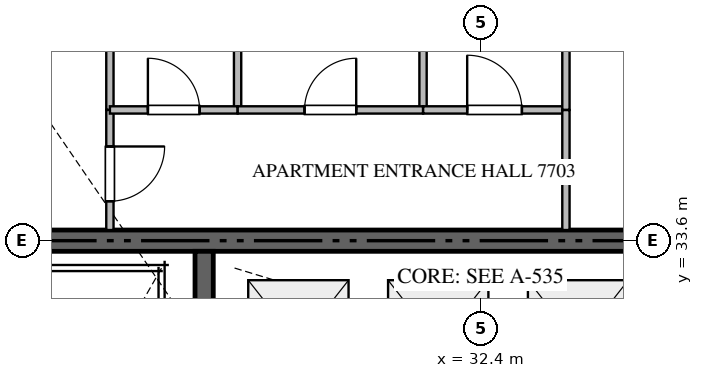
"""IFC4 building model, lengths in metres.
Left out: names, types, materials, properties, quantities, classifications, styles, units other than length and angle.
Written with IfcOpenShell. Run it as: python <this file> out.ifc"""

import sys

from ifc_helpers import new_model, si_unit, direction, frame, frame_2d, origin, place, context, subcontext, project, spatial, rectangle, extrude, source, transform, mapped, element, fill, save


model = new_model("IFC4")
c1 = context("Model", 3, precision=1e-05, world=origin(), true_north=direction((0.0, 1.0)))
c2 = subcontext(c1, "Body", "Model", "MODEL_VIEW")
j1 = project(units=[si_unit("LENGTHUNIT", "METRE"), si_unit("PLANEANGLEUNIT", "RADIAN")], contexts=[c1])
p1 = place(None, origin())
s1 = spatial("IfcSite", under=j1, at=p1, CompositionType="ELEMENT")
p2 = place(p1, origin())
s2 = spatial("IfcBuilding", under=s1, at=p2, CompositionType="ELEMENT")
p3 = place(p2, frame((0.0, 0.0, 309.65)))
s3 = spatial("IfcBuildingStorey", under=s2, at=p3, CompositionType="ELEMENT", Elevation=309.65)
p4 = place(p3, frame((41.4, 33.6, -0.26), z_axis=(0.0, 0.0, 1.0), x_axis=(-1.0, 0.0, 0.0)))
e1 = element("IfcWall", 1, at=p4, inside=s3, PredefinedType="SHEAR", context=c2, shape_type="SweptSolid", body=[
    extrude(rectangle(XDim=18.0, YDim=0.35, at=frame_2d((9.0, 0.0))), origin(), (0.0, 0.0, 1.0), 4.048),
])
p5 = place(p3, frame((27.85, 23.55, -0.26), z_axis=(0.0, 0.0, 1.0), x_axis=(0.0, 1.0, 0.0)))
e2 = element("IfcWall", 2, at=p5, inside=s3, PredefinedType="SHEAR", context=c2, shape_type="SweptSolid", body=[
    extrude(rectangle(XDim=9.875, YDim=0.3, at=frame_2d((4.938, 0.0))), origin(), (0.0, 0.0, 1.0), 4.048),
])
p6 = place(p3, frame((26.3, 35.75, 0.0), z_axis=(0.0, 0.0, 1.0), x_axis=(0.0, -1.0, 0.0)))
e3 = element("IfcWall", 3, at=p6, inside=s3, PredefinedType="PARTITIONING", context=c2, shape_type="SweptSolid", body=[
    extrude(rectangle(XDim=1.975, YDim=0.12, at=frame_2d((0.988, 0.0))), origin(), (0.0, 0.0, 1.0), 3.79),
])
p7 = place(p6, frame((0.601, 0.0, 0.0)))
e4 = element("IfcOpeningElement", 4, at=p7, cuts=e3, PredefinedType="OPENING", context=c2, shape_type="SweptSolid", body=[
    extrude(rectangle(XDim=0.9, YDim=2.1, at=frame_2d((0.45, 1.05))), frame((0.0, 0.07, 0.0), z_axis=(0.0, -1.0, 0.0), x_axis=(1.0, 0.0, 0.0)), (0.0, 0.0, 1.0), 0.14),
])
p8 = place(p3, frame((26.3, 41.628, 0.0), z_axis=(0.0, 0.0, 1.0), x_axis=(0.0, -1.0, 0.0)))
e5 = element("IfcWall", 5, at=p8, inside=s3, PredefinedType="PARTITIONING", context=c2, shape_type="SweptSolid", body=[
    extrude(rectangle(XDim=5.876, YDim=0.12, at=frame_2d((2.938, 0.0))), origin(), (0.0, 0.0, 1.0), 3.79),
])
p9 = place(p3, frame((31.45, 47.905, 0.0), z_axis=(0.0, 0.0, 1.0), x_axis=(0.0, -1.0, 0.0)))
e6 = element("IfcWall", 6, at=p9, inside=s3, PredefinedType="PARTITIONING", context=c2, shape_type="SweptSolid", body=[
    extrude(rectangle(XDim=12.155, YDim=0.12, at=frame_2d((6.078, 0.0))), origin(), (0.0, 0.0, 1.0), 3.79),
])
p10 = place(p3, frame((28.4, 41.63, 0.0), z_axis=(0.0, 0.0, 1.0), x_axis=(0.0, -1.0, 0.0)))
e7 = element("IfcWall", 7, at=p10, inside=s3, PredefinedType="PARTITIONING", context=c2, shape_type="SweptSolid", body=[
    extrude(rectangle(XDim=5.88, YDim=0.12, at=frame_2d((2.94, 0.0))), origin(), (0.0, 0.0, 1.0), 3.79),
])
p11 = place(p3, frame((26.3, 35.75, 0.0), z_axis=(0.0, 0.0, 1.0), x_axis=(1.0, 0.0, 0.0)))
e8 = element("IfcWall", 8, at=p11, inside=s3, PredefinedType="PARTITIONING", context=c2, shape_type="SweptSolid", body=[
    extrude(rectangle(XDim=2.1, YDim=0.12, at=frame_2d((1.05, 0.0))), origin(), (0.0, 0.0, 1.0), 3.79),
])
p12 = place(p11, frame((0.625, 0.0, 0.0)))
e9 = element("IfcOpeningElement", 9, at=p12, cuts=e8, PredefinedType="OPENING", context=c2, shape_type="SweptSolid", body=[
    extrude(rectangle(XDim=0.85, YDim=2.1, at=frame_2d((0.425, 1.05))), frame((0.0, 0.07, 0.0), z_axis=(0.0, -1.0, 0.0), x_axis=(1.0, 0.0, 0.0)), (0.0, 0.0, 1.0), 0.14),
])
p13 = place(p3, frame((28.402, 35.75, 0.0), z_axis=(0.0, 0.0, 1.0), x_axis=(1.0, 0.0, 0.0)))
e10 = element("IfcWall", 10, at=p13, inside=s3, PredefinedType="PARTITIONING", context=c2, shape_type="SweptSolid", body=[
    extrude(rectangle(XDim=3.048, YDim=0.12, at=frame_2d((1.524, 0.0))), origin(), (0.0, 0.0, 1.0), 3.79),
])
p14 = place(p13, frame((1.099, 0.0, 0.0)))
e11 = element("IfcOpeningElement", 11, at=p14, cuts=e10, PredefinedType="OPENING", context=c2, shape_type="SweptSolid", body=[
    extrude(rectangle(XDim=0.85, YDim=2.1, at=frame_2d((0.425, 1.05))), frame((0.0, 0.07, 0.0), z_axis=(0.0, -1.0, 0.0), x_axis=(1.0, 0.0, 0.0)), (0.0, 0.0, 1.0), 0.14),
])
p15 = place(p3, frame((31.452, 35.75, 0.0), z_axis=(0.0, 0.0, 1.0), x_axis=(1.0, 0.0, 0.0)))
e12 = element("IfcWall", 12, at=p15, inside=s3, PredefinedType="PARTITIONING", context=c2, shape_type="SweptSolid", body=[
    extrude(rectangle(XDim=2.348, YDim=0.12, at=frame_2d((1.174, 0.0))), origin(), (0.0, 0.0, 1.0), 3.79),
])
p16 = place(p15, frame((0.724, 0.0, 0.0)))
e13 = element("IfcOpeningElement", 13, at=p16, cuts=e12, PredefinedType="OPENING", context=c2, shape_type="SweptSolid", body=[
    extrude(rectangle(XDim=0.9, YDim=2.1, at=frame_2d((0.45, 1.05))), frame((0.0, 0.07, 0.0), z_axis=(0.0, -1.0, 0.0), x_axis=(1.0, 0.0, 0.0)), (0.0, 0.0, 1.0), 0.14),
])
p17 = place(p3, frame((33.8, 40.607, 0.0), z_axis=(0.0, 0.0, 1.0), x_axis=(0.0, -1.0, 0.0)))
e14 = element("IfcWall", 14, at=p17, inside=s3, PredefinedType="PARTITIONING", context=c2, shape_type="SweptSolid", body=[
    extrude(rectangle(XDim=4.857, YDim=0.12, at=frame_2d((2.428, 0.0))), origin(), (0.0, 0.0, 1.0), 3.79),
])
p18 = place(p17, frame((2.003, 0.0, 0.0)))
e15 = element("IfcOpeningElement", 15, at=p18, cuts=e14, PredefinedType="OPENING", context=c2, shape_type="SweptSolid", body=[
    extrude(rectangle(XDim=0.85, YDim=2.1, at=frame_2d((0.425, 1.05))), frame((0.0, 0.07, 0.0), z_axis=(0.0, -1.0, 0.0), x_axis=(1.0, 0.0, 0.0)), (0.0, 0.0, 1.0), 0.14),
])
p19 = place(p3, frame((33.8, 35.748, 0.0), z_axis=(0.0, 0.0, 1.0), x_axis=(0.0, -1.0, 0.0)))
e16 = element("IfcWall", 16, at=p19, inside=s3, PredefinedType="PARTITIONING", context=c2, shape_type="SweptSolid", body=[
    extrude(rectangle(XDim=1.973, YDim=0.12, at=frame_2d((0.987, 0.0))), origin(), (0.0, 0.0, 1.0), 3.79),
])
m1 = source(origin(), c2, "Body", "SweptSolid", [
    extrude(rectangle(XDim=0.9, YDim=2.1, at=frame_2d((0.45, 1.05))), frame((0.0, 0.025, 0.0), z_axis=(0.0, -1.0, 0.0), x_axis=(1.0, 0.0, 0.0)), (0.0, 0.0, 1.0), 0.05),
])
p20 = place(p7, origin())
e17 = element("IfcDoor", 17, at=p20, inside=s3, OperationType="SINGLE_SWING_LEFT", PredefinedType="DOOR", context=c2, shape_type="MappedRepresentation", body=[
    mapped(m1, transform((0.0, 0.0, 0.0), scale=1.0)),
])
fill(e4, e17)
m2 = source(origin(), c2, "Body", "SweptSolid", [
    extrude(rectangle(XDim=0.85, YDim=2.1, at=frame_2d((0.425, 1.05))), frame((0.0, 0.025, 0.0), z_axis=(0.0, -1.0, 0.0), x_axis=(1.0, 0.0, 0.0)), (0.0, 0.0, 1.0), 0.05),
])
p21 = place(p12, origin())
e18 = element("IfcDoor", 18, at=p21, inside=s3, OperationType="SINGLE_SWING_LEFT", PredefinedType="DOOR", context=c2, shape_type="MappedRepresentation", body=[
    mapped(m2, transform((0.0, 0.0, 0.0), scale=1.0)),
])
fill(e9, e18)
p22 = place(p14, origin())
e19 = element("IfcDoor", 19, at=p22, inside=s3, OperationType="SINGLE_SWING_RIGHT", PredefinedType="DOOR", context=c2, shape_type="MappedRepresentation", body=[
    mapped(m2, transform((0.0, 0.0, 0.0), scale=1.0)),
])
fill(e11, e19)
p23 = place(p16, origin())
e20 = element("IfcDoor", 20, at=p23, inside=s3, OperationType="SINGLE_SWING_LEFT", PredefinedType="DOOR", context=c2, shape_type="MappedRepresentation", body=[
    mapped(m1, transform((0.0, 0.0, 0.0), scale=1.0)),
])
fill(e13, e20)
save(model, sys.argv[1])
